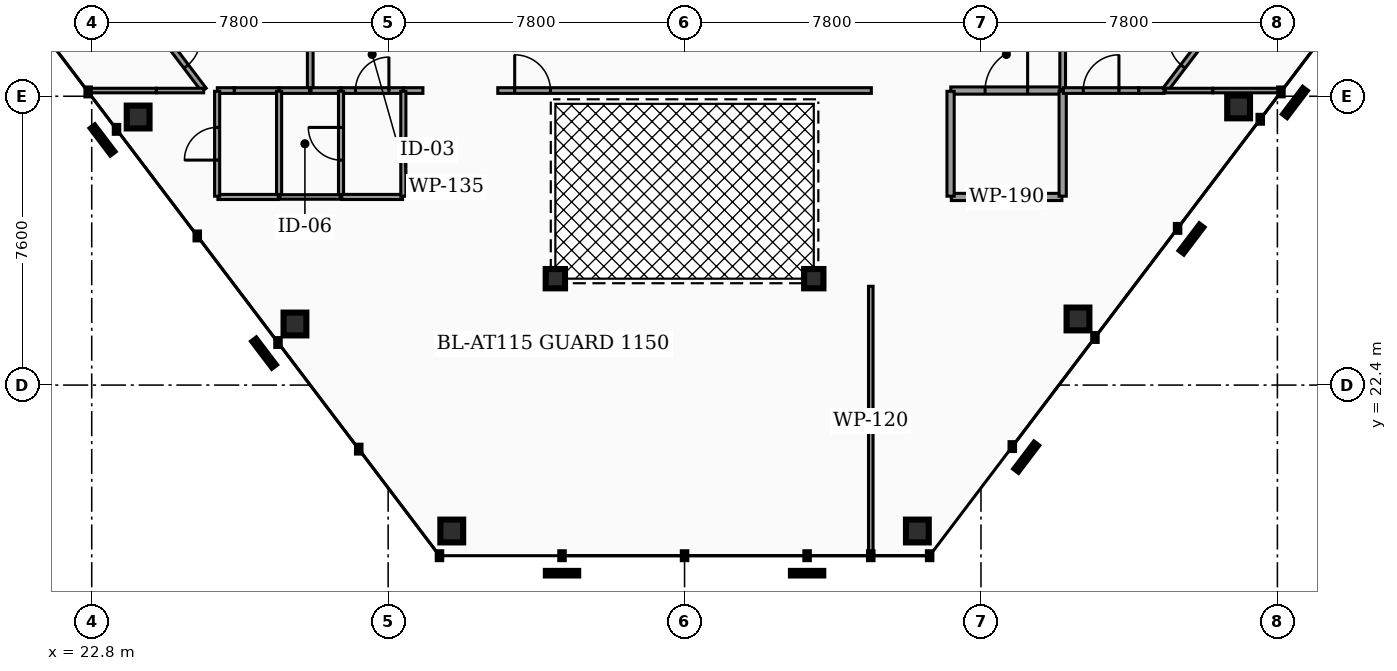
"""IFC4 building model, lengths in metres.
Left out: names, types, materials, properties, quantities, classifications, styles, units other than length and angle.
Written with IfcOpenShell. Run it as: python <this file> out.ifc"""

import sys

from ifc_helpers import new_model, si_unit, direction, frame, frame_2d, origin, origin_2d, place, context, subcontext, project, spatial, rectangle, hollow_rectangle, hollow_circle, extrude, element, fill, save


model = new_model("IFC4")
c1 = context("Model", 3, precision=1e-05, world=origin(), true_north=direction((0.0, 1.0)))
c2 = subcontext(c1, "Body", "Model", "MODEL_VIEW")
j1 = project(units=[si_unit("LENGTHUNIT", "METRE"), si_unit("PLANEANGLEUNIT", "RADIAN")], contexts=[c1])
p1 = place(None, origin())
s1 = spatial("IfcSite", under=j1, at=p1, CompositionType="ELEMENT")
p2 = place(p1, origin())
s2 = spatial("IfcBuilding", under=s1, at=p2, CompositionType="ELEMENT")
p3 = place(p2, frame((0.0, 0.0, 212.16)))
s3 = spatial("IfcBuildingStorey", under=s2, at=p3, CompositionType="ELEMENT", Elevation=212.16)
for number, where, z_axis, x_axis in (
    (1, (24.021, 29.454, 0.0), (0.0, 0.0, 1.0), (1.0, 0.0, 0.0)),
    (2, (28.148, 24.007, 0.0), (0.0, 0.0, 1.0), (1.0, 0.0, 0.0)),
    (3, (32.274, 18.561, 0.0), (0.0, 0.0, 1.0), (1.0, 0.0, 0.0)),
    (4, (44.526, 18.561, 0.0), (0.0, 0.0, 1.0), (1.0, 0.0, 0.0)),
    (5, (48.753, 24.14, 0.0), (0.0, 0.0, 1.0), (1.0, 0.0, 0.0)),
    (6, (52.979, 29.719, 0.0), (0.0, 0.0, 1.0), (1.0, 0.0, 0.0)),
):
    element("IfcColumn", number, at=place(p3, frame(where, z_axis=z_axis, x_axis=x_axis)), inside=s3, PredefinedType="COLUMN", context=c2, shape_type="SweptSolid", body=[
        extrude(hollow_rectangle(XDim=0.6, YDim=0.6, WallThickness=0.03, at=origin_2d()), origin(), (0.0, 0.0, 1.0), 3.18),
    ])
for number, where, z_axis, x_axis in (
    (7, (35.0, 25.2, 0.0), (0.0, 0.0, 1.0), (1.0, 0.0, 0.0)),
    (8, (41.8, 25.2, 0.0), (0.0, 0.0, 1.0), (1.0, 0.0, 0.0)),
):
    element("IfcColumn", number, at=place(p3, frame(where, z_axis=z_axis, x_axis=x_axis)), inside=s3, PredefinedType="COLUMN", context=c2, shape_type="SweptSolid", body=[
        extrude(hollow_circle(Radius=0.254, WallThickness=0.02, at=origin_2d()), origin(), (0.0, 0.0, 1.0), 3.18),
    ])
p4 = place(p3, frame((45.405, 30.15, 0.0), z_axis=(0.0, 0.0, 1.0), x_axis=(1.0, 0.0, 0.0)))
e9 = element("IfcWall", 9, at=p4, inside=s3, PredefinedType="PARTITIONING", context=c2, shape_type="SweptSolid", body=[
    extrude(rectangle(XDim=2.925, YDim=0.19, at=frame_2d((1.462, 0.0))), origin(), (0.0, 0.0, 1.0), 2.235),
])
p5 = place(p4, frame((0.903, 0.0, 0.0)))
e10 = element("IfcOpeningElement", 10, at=p5, cuts=e9, PredefinedType="OPENING", context=c2, shape_type="SweptSolid", body=[
    extrude(rectangle(XDim=1.12, YDim=2.05, at=frame_2d((0.56, 1.025))), frame((0.0, 0.105, 0.0), z_axis=(0.0, -1.0, 0.0), x_axis=(1.0, 0.0, 0.0)), (0.0, 0.0, 1.0), 0.21),
])
p6 = place(p3, frame((28.55, 30.17, 0.0), z_axis=(0.0, 0.0, 1.0), x_axis=(0.0, 1.0, 0.0)))
e11 = element("IfcWall", 11, at=p6, inside=s3, PredefinedType="PARTITIONING", context=c2, shape_type="SweptSolid", body=[
    extrude(rectangle(XDim=3.06, YDim=0.15, at=frame_2d((1.53, 0.0))), origin(), (0.0, 0.0, 1.0), 2.235),
])
p7 = place(p6, frame((1.06, 0.0, 0.0)))
e12 = element("IfcOpeningElement", 12, at=p7, cuts=e11, PredefinedType="OPENING", context=c2, shape_type="SweptSolid", body=[
    extrude(rectangle(XDim=0.94, YDim=2.05, at=frame_2d((0.47, 1.025))), frame((0.0, 0.085, 0.0), z_axis=(0.0, -1.0, 0.0), x_axis=(1.0, 0.0, 0.0)), (0.0, 0.0, 1.0), 0.17),
])
p8 = place(p3, frame((48.35, 30.17, 0.0), z_axis=(0.0, 0.0, 1.0), x_axis=(0.0, 1.0, 0.0)))
e13 = element("IfcWall", 13, at=p8, inside=s3, PredefinedType="PARTITIONING", context=c2, shape_type="SweptSolid", body=[
    extrude(rectangle(XDim=3.06, YDim=0.15, at=frame_2d((1.53, 0.0))), origin(), (0.0, 0.0, 1.0), 2.235),
])
p9 = place(p3, frame((29.365, 30.15, 0.0), z_axis=(0.0, 0.0, 1.0), x_axis=(1.0, 0.0, 0.0)))
e14 = element("IfcWall", 14, at=p9, inside=s3, PredefinedType="PARTITIONING", context=c2, shape_type="SweptSolid", body=[
    extrude(rectangle(XDim=1.63, YDim=0.15, at=frame_2d((0.815, 0.0))), origin(), (0.0, 0.0, 1.0), 2.235),
])
p10 = place(p9, frame((0.375, 0.0, 0.0)))
e15 = element("IfcOpeningElement", 15, at=p10, cuts=e14, PredefinedType="OPENING", context=c2, shape_type="SweptSolid", body=[
    extrude(rectangle(XDim=0.88, YDim=2.05, at=frame_2d((0.44, 1.025))), frame((0.0, 0.085, 0.0), z_axis=(0.0, -1.0, 0.0), x_axis=(1.0, 0.0, 0.0)), (0.0, 0.0, 1.0), 0.17),
])
p11 = place(p3, frame((28.57, 30.15, 0.0), z_axis=(0.0, 0.0, 1.0), x_axis=(1.0, 0.0, 0.0)))
e16 = element("IfcWall", 16, at=p11, inside=s3, PredefinedType="PARTITIONING", context=c2, shape_type="SweptSolid", body=[
    extrude(rectangle(XDim=0.785, YDim=0.15, at=frame_2d((0.393, 0.0))), origin(), (0.0, 0.0, 1.0), 2.235),
])
p12 = place(p3, frame((33.485, 30.15, 0.0), z_axis=(0.0, 0.0, 1.0), x_axis=(1.0, 0.0, 0.0)))
e17 = element("IfcWall", 17, at=p12, inside=s3, PredefinedType="PARTITIONING", context=c2, shape_type="SweptSolid", body=[
    extrude(rectangle(XDim=9.83, YDim=0.15, at=frame_2d((4.915, 0.0))), origin(), (0.0, 0.0, 1.0), 2.235),
])
p13 = place(p12, frame((0.445, 0.0, 0.0)))
e18 = element("IfcOpeningElement", 18, at=p13, cuts=e17, PredefinedType="OPENING", context=c2, shape_type="SweptSolid", body=[
    extrude(rectangle(XDim=0.94, YDim=2.05, at=frame_2d((0.47, 1.025))), frame((0.0, 0.085, 0.0), z_axis=(0.0, -1.0, 0.0), x_axis=(1.0, 0.0, 0.0)), (0.0, 0.0, 1.0), 0.17),
])
p14 = place(p3, frame((31.005, 30.15, 0.0), z_axis=(0.0, 0.0, 1.0), x_axis=(1.0, 0.0, 0.0)))
e19 = element("IfcWall", 19, at=p14, inside=s3, PredefinedType="PARTITIONING", context=c2, shape_type="SweptSolid", body=[
    extrude(rectangle(XDim=0.51, YDim=0.15, at=frame_2d((0.255, 0.0))), origin(), (0.0, 0.0, 1.0), 2.235),
])
p15 = place(p3, frame((45.42, 27.35, 0.0), z_axis=(0.0, 0.0, 1.0), x_axis=(1.0, 0.0, 0.0)))
e20 = element("IfcWall", 20, at=p15, inside=s3, PredefinedType="PARTITIONING", context=c2, shape_type="SweptSolid", body=[
    extrude(rectangle(XDim=2.91, YDim=0.19, at=frame_2d((1.455, 0.0))), origin(), (0.0, 0.0, 1.0), 2.235),
])
for number, where, z_axis, x_axis in (
    (21, (45.4, 27.37, 0.0), (0.0, 0.0, 1.0), (0.0, 1.0, 0.0)),
    (22, (48.35, 27.37, 0.0), (0.0, 0.0, 1.0), (0.0, 1.0, 0.0)),
):
    element("IfcWall", number, at=place(p3, frame(where, z_axis=z_axis, x_axis=x_axis)), inside=s3, PredefinedType="PARTITIONING", context=c2, shape_type="SweptSolid", body=[
        extrude(rectangle(XDim=2.76, YDim=0.19, at=frame_2d((1.38, 0.0))), origin(), (0.0, 0.0, 1.0), 2.235),
    ])
p16 = place(p3, frame((26.55, 30.15, 0.0), z_axis=(0.0, 0.0, 1.0), x_axis=(1.0, 0.0, 0.0)))
e23 = element("IfcWall", 23, at=p16, inside=s3, PredefinedType="PARTITIONING", context=c2, shape_type="SweptSolid", body=[
    extrude(rectangle(XDim=1.175, YDim=0.15, at=frame_2d((0.587, 0.0))), origin(), (0.0, 0.0, 1.0), 2.235),
])
p17 = place(p3, frame((26.105, 30.15, 0.0), z_axis=(0.0, 0.0, 1.0), x_axis=(1.0, 0.0, 0.0)))
e24 = element("IfcWall", 24, at=p17, inside=s3, PredefinedType="PARTITIONING", context=c2, shape_type="SweptSolid", body=[
    extrude(rectangle(XDim=0.445, YDim=0.15, at=frame_2d((0.223, 0.0))), origin(), (0.0, 0.0, 1.0), 2.235),
])
p18 = place(p3, frame((27.735, 30.15, 0.0), z_axis=(0.0, 0.0, 1.0), x_axis=(1.0, 0.0, 0.0)))
e25 = element("IfcWall", 25, at=p18, inside=s3, PredefinedType="PARTITIONING", context=c2, shape_type="SweptSolid", body=[
    extrude(rectangle(XDim=0.795, YDim=0.15, at=frame_2d((0.397, 0.0))), origin(), (0.0, 0.0, 1.0), 2.235),
])
p19 = place(p3, frame((50.35, 30.15, 0.0), z_axis=(0.0, 0.0, 1.0), x_axis=(1.0, 0.0, 0.0)))
e26 = element("IfcWall", 26, at=p19, inside=s3, PredefinedType="PARTITIONING", context=c2, shape_type="SweptSolid", body=[
    extrude(rectangle(XDim=0.665, YDim=0.15, at=frame_2d((0.333, 0.0))), origin(), (0.0, 0.0, 1.0), 2.235),
])
p20 = place(p3, frame((48.37, 30.15, 0.0), z_axis=(0.0, 0.0, 1.0), x_axis=(1.0, 0.0, 0.0)))
e27 = element("IfcWall", 27, at=p20, inside=s3, PredefinedType="PARTITIONING", context=c2, shape_type="SweptSolid", body=[
    extrude(rectangle(XDim=1.98, YDim=0.15, at=frame_2d((0.99, 0.0))), origin(), (0.0, 0.0, 1.0), 2.235),
])
p21 = place(p20, frame((0.52, 0.0, 0.0)))
e28 = element("IfcOpeningElement", 28, at=p21, cuts=e27, PredefinedType="OPENING", context=c2, shape_type="SweptSolid", body=[
    extrude(rectangle(XDim=0.94, YDim=2.05, at=frame_2d((0.47, 1.025))), frame((0.0, 0.085, 0.0), z_axis=(0.0, -1.0, 0.0), x_axis=(1.0, 0.0, 0.0)), (0.0, 0.0, 1.0), 0.17),
])
p22 = place(p3, frame((24.25, 32.15, 0.0), z_axis=(0.0, 0.0, 1.0), x_axis=(0.60385391082, -0.797095009637, 0.0)))
e29 = element("IfcWall", 29, at=p22, inside=s3, PredefinedType="PARTITIONING", context=c2, shape_type="SweptSolid", body=[
    extrude(rectangle(XDim=2.489, YDim=0.15, at=frame_2d((1.245, 0.0))), origin(), (0.0, 0.0, 1.0), 2.235),
])
p23 = place(p22, frame((0.775, 0.0, 0.0)))
e30 = element("IfcOpeningElement", 30, at=p23, cuts=e29, PredefinedType="OPENING", context=c2, shape_type="SweptSolid", body=[
    extrude(rectangle(XDim=0.94, YDim=2.05, at=frame_2d((0.47, 1.025))), frame((0.0, 0.085, 0.0), z_axis=(0.0, -1.0, 0.0), x_axis=(1.0, 0.0, 0.0)), (0.0, 0.0, 1.0), 0.17),
])
p24 = place(p3, frame((51.047, 30.166, 0.0), z_axis=(0.0, 0.0, 1.0), x_axis=(0.60385391082, 0.797095009637, 0.0)))
e31 = element("IfcWall", 31, at=p24, inside=s3, PredefinedType="PARTITIONING", context=c2, shape_type="SweptSolid", body=[
    extrude(rectangle(XDim=2.489, YDim=0.15, at=frame_2d((1.245, 0.0))), origin(), (0.0, 0.0, 1.0), 2.235),
])
p25 = place(p24, frame((0.775, 0.0, 0.0)))
e32 = element("IfcOpeningElement", 32, at=p25, cuts=e31, PredefinedType="OPENING", context=c2, shape_type="SweptSolid", body=[
    extrude(rectangle(XDim=0.94, YDim=2.05, at=frame_2d((0.47, 1.025))), frame((0.0, 0.085, 0.0), z_axis=(0.0, -1.0, 0.0), x_axis=(1.0, 0.0, 0.0)), (0.0, 0.0, 1.0), 0.17),
])
p26 = place(p3, frame((29.36, 27.37, 0.0), z_axis=(0.0, 0.0, 1.0), x_axis=(0.0, 1.0, 0.0)))
e33 = element("IfcWall", 33, at=p26, inside=s3, PredefinedType="PARTITIONING", context=c2, shape_type="SweptSolid", body=[
    extrude(rectangle(XDim=2.76, YDim=0.135, at=frame_2d((1.38, 0.0))), origin(), (0.0, 0.0, 1.0), 2.235),
])
p27 = place(p26, frame((0.95, 0.0, 0.0)))
e34 = element("IfcOpeningElement", 34, at=p27, cuts=e33, PredefinedType="OPENING", context=c2, shape_type="SweptSolid", body=[
    extrude(rectangle(XDim=0.86, YDim=2.05, at=frame_2d((0.43, 1.025))), frame((0.0, 0.077, 0.0), z_axis=(0.0, -1.0, 0.0), x_axis=(1.0, 0.0, 0.0)), (0.0, 0.0, 1.0), 0.155),
])
p28 = place(p3, frame((29.38, 27.35, 0.0), z_axis=(0.0, 0.0, 1.0), x_axis=(1.0, 0.0, 0.0)))
e35 = element("IfcWall", 35, at=p28, inside=s3, PredefinedType="PARTITIONING", context=c2, shape_type="SweptSolid", body=[
    extrude(rectangle(XDim=1.6, YDim=0.135, at=frame_2d((0.8, 0.0))), origin(), (0.0, 0.0, 1.0), 2.235),
])
for number, where, z_axis, x_axis in (
    (36, (31.0, 27.37, 0.0), (0.0, 0.0, 1.0), (0.0, 1.0, 0.0)),
    (37, (27.73, 27.37, 0.0), (0.0, 0.0, 1.0), (0.0, 1.0, 0.0)),
):
    element("IfcWall", number, at=place(p3, frame(where, z_axis=z_axis, x_axis=x_axis)), inside=s3, PredefinedType="PARTITIONING", context=c2, shape_type="SweptSolid", body=[
        extrude(rectangle(XDim=2.76, YDim=0.135, at=frame_2d((1.38, 0.0))), origin(), (0.0, 0.0, 1.0), 2.235),
    ])
p29 = place(p3, frame((26.12, 27.35, 0.0), z_axis=(0.0, 0.0, 1.0), x_axis=(1.0, 0.0, 0.0)))
e38 = element("IfcWall", 38, at=p29, inside=s3, PredefinedType="PARTITIONING", context=c2, shape_type="SweptSolid", body=[
    extrude(rectangle(XDim=1.59, YDim=0.135, at=frame_2d((0.795, 0.0))), origin(), (0.0, 0.0, 1.0), 2.235),
])
p30 = place(p3, frame((26.1, 27.37, 0.0), z_axis=(0.0, 0.0, 1.0), x_axis=(0.0, 1.0, 0.0)))
e39 = element("IfcWall", 39, at=p30, inside=s3, PredefinedType="PARTITIONING", context=c2, shape_type="SweptSolid", body=[
    extrude(rectangle(XDim=2.76, YDim=0.135, at=frame_2d((1.38, 0.0))), origin(), (0.0, 0.0, 1.0), 2.235),
])
p31 = place(p30, frame((0.95, 0.0, 0.0)))
e40 = element("IfcOpeningElement", 40, at=p31, cuts=e39, PredefinedType="OPENING", context=c2, shape_type="SweptSolid", body=[
    extrude(rectangle(XDim=0.86, YDim=2.05, at=frame_2d((0.43, 1.025))), frame((0.0, 0.077, 0.0), z_axis=(0.0, -1.0, 0.0), x_axis=(1.0, 0.0, 0.0)), (0.0, 0.0, 1.0), 0.155),
])
p32 = place(p3, frame((27.75, 27.35, 0.0), z_axis=(0.0, 0.0, 1.0), x_axis=(1.0, 0.0, 0.0)))
e41 = element("IfcWall", 41, at=p32, inside=s3, PredefinedType="PARTITIONING", context=c2, shape_type="SweptSolid", body=[
    extrude(rectangle(XDim=1.59, YDim=0.12, at=frame_2d((0.795, 0.0))), origin(), (0.0, 0.0, 1.0), 2.235),
])
p33 = place(p3, frame((43.3, 17.926, 0.0), z_axis=(0.0, 0.0, 1.0), x_axis=(0.0, 1.0, 0.0)))
e42 = element("IfcWall", 42, at=p33, inside=s3, PredefinedType="PARTITIONING", context=c2, shape_type="SweptSolid", body=[
    extrude(rectangle(XDim=7.074, YDim=0.12, at=frame_2d((3.537, 0.0))), origin(), (0.0, 0.0, 1.0), 2.235),
])
p34 = place(p3, frame((24.5, 30.15, 0.0), z_axis=(0.0, 0.0, 1.0), x_axis=(1.0, 0.0, 0.0)))
e43 = element("IfcWall", 43, at=p34, inside=s3, PredefinedType="PARTITIONING", context=c2, shape_type="SweptSolid", body=[
    extrude(rectangle(XDim=1.245, YDim=0.12, at=frame_2d((0.623, 0.0))), origin(), (0.0, 0.0, 1.0), 2.235),
])
p35 = place(p3, frame((22.694, 30.15, 0.0), z_axis=(0.0, 0.0, 1.0), x_axis=(1.0, 0.0, 0.0)))
e44 = element("IfcWall", 44, at=p35, inside=s3, PredefinedType="PARTITIONING", context=c2, shape_type="SweptSolid", body=[
    extrude(rectangle(XDim=1.806, YDim=0.12, at=frame_2d((0.903, 0.0))), origin(), (0.0, 0.0, 1.0), 2.235),
])
p36 = place(p3, frame((51.055, 30.15, 0.0), z_axis=(0.0, 0.0, 1.0), x_axis=(1.0, 0.0, 0.0)))
e45 = element("IfcWall", 45, at=p36, inside=s3, PredefinedType="PARTITIONING", context=c2, shape_type="SweptSolid", body=[
    extrude(rectangle(XDim=1.245, YDim=0.12, at=frame_2d((0.623, 0.0))), origin(), (0.0, 0.0, 1.0), 2.235),
])
p37 = place(p3, frame((52.3, 30.15, 0.0), z_axis=(0.0, 0.0, 1.0), x_axis=(1.0, 0.0, 0.0)))
e46 = element("IfcWall", 46, at=p37, inside=s3, PredefinedType="PARTITIONING", context=c2, shape_type="SweptSolid", body=[
    extrude(rectangle(XDim=1.806, YDim=0.12, at=frame_2d((0.903, 0.0))), origin(), (0.0, 0.0, 1.0), 2.235),
])
p38 = place(p5, origin())
e47 = element("IfcDoor", 47, at=p38, inside=s3, OperationType="SINGLE_SWING_RIGHT", PredefinedType="DOOR", context=c2, shape_type="SweptSolid", body=[
    extrude(rectangle(XDim=1.12, YDim=2.05, at=frame_2d((0.56, 1.025))), frame((0.0, 0.025, 0.0), z_axis=(0.0, -1.0, 0.0), x_axis=(1.0, 0.0, 0.0)), (0.0, 0.0, 1.0), 0.05),
])
fill(e10, e47)
p39 = place(p10, origin())
e48 = element("IfcDoor", 48, at=p39, inside=s3, OperationType="SINGLE_SWING_RIGHT", PredefinedType="DOOR", context=c2, shape_type="SweptSolid", body=[
    extrude(rectangle(XDim=0.88, YDim=2.05, at=frame_2d((0.44, 1.025))), frame((0.0, 0.025, 0.0), z_axis=(0.0, -1.0, 0.0), x_axis=(1.0, 0.0, 0.0)), (0.0, 0.0, 1.0), 0.05),
])
fill(e15, e48)
p40 = place(p13, origin())
e49 = element("IfcDoor", 49, at=p40, inside=s3, OperationType="SINGLE_SWING_LEFT", PredefinedType="DOOR", context=c2, shape_type="SweptSolid", body=[
    extrude(rectangle(XDim=0.94, YDim=2.05, at=frame_2d((0.47, 1.025))), frame((0.0, 0.025, 0.0), z_axis=(0.0, -1.0, 0.0), x_axis=(1.0, 0.0, 0.0)), (0.0, 0.0, 1.0), 0.05),
])
fill(e18, e49)
p41 = place(p21, origin())
e50 = element("IfcDoor", 50, at=p41, inside=s3, OperationType="SINGLE_SWING_RIGHT", PredefinedType="DOOR", context=c2, shape_type="SweptSolid", body=[
    extrude(rectangle(XDim=0.94, YDim=2.05, at=frame_2d((0.47, 1.025))), frame((0.0, 0.025, 0.0), z_axis=(0.0, -1.0, 0.0), x_axis=(1.0, 0.0, 0.0)), (0.0, 0.0, 1.0), 0.05),
])
fill(e28, e50)
p42 = place(p23, origin())
e51 = element("IfcDoor", 51, at=p42, inside=s3, OperationType="SINGLE_SWING_LEFT", PredefinedType="DOOR", context=c2, shape_type="SweptSolid", body=[
    extrude(rectangle(XDim=0.94, YDim=2.05, at=frame_2d((0.47, 1.025))), frame((0.0, 0.025, 0.0), z_axis=(0.0, -1.0, 0.0), x_axis=(1.0, 0.0, 0.0)), (0.0, 0.0, 1.0), 0.05),
])
fill(e30, e51)
p43 = place(p25, origin())
e52 = element("IfcDoor", 52, at=p43, inside=s3, OperationType="SINGLE_SWING_RIGHT", PredefinedType="DOOR", context=c2, shape_type="SweptSolid", body=[
    extrude(rectangle(XDim=0.94, YDim=2.05, at=frame_2d((0.47, 1.025))), frame((0.0, 0.025, 0.0), z_axis=(0.0, -1.0, 0.0), x_axis=(1.0, 0.0, 0.0)), (0.0, 0.0, 1.0), 0.05),
])
fill(e32, e52)
p44 = place(p27, origin())
e53 = element("IfcDoor", 53, at=p44, inside=s3, OperationType="SINGLE_SWING_RIGHT", PredefinedType="DOOR", context=c2, shape_type="SweptSolid", body=[
    extrude(rectangle(XDim=0.86, YDim=2.05, at=frame_2d((0.43, 1.025))), frame((0.0, 0.025, 0.0), z_axis=(0.0, -1.0, 0.0), x_axis=(1.0, 0.0, 0.0)), (0.0, 0.0, 1.0), 0.05),
])
fill(e34, e53)
p45 = place(p31, origin())
e54 = element("IfcDoor", 54, at=p45, inside=s3, OperationType="SINGLE_SWING_LEFT", PredefinedType="DOOR", context=c2, shape_type="SweptSolid", body=[
    extrude(rectangle(XDim=0.86, YDim=2.05, at=frame_2d((0.43, 1.025))), frame((0.0, 0.025, 0.0), z_axis=(0.0, -1.0, 0.0), x_axis=(1.0, 0.0, 0.0)), (0.0, 0.0, 1.0), 0.05),
])
fill(e40, e54)
save(model, sys.argv[1])
